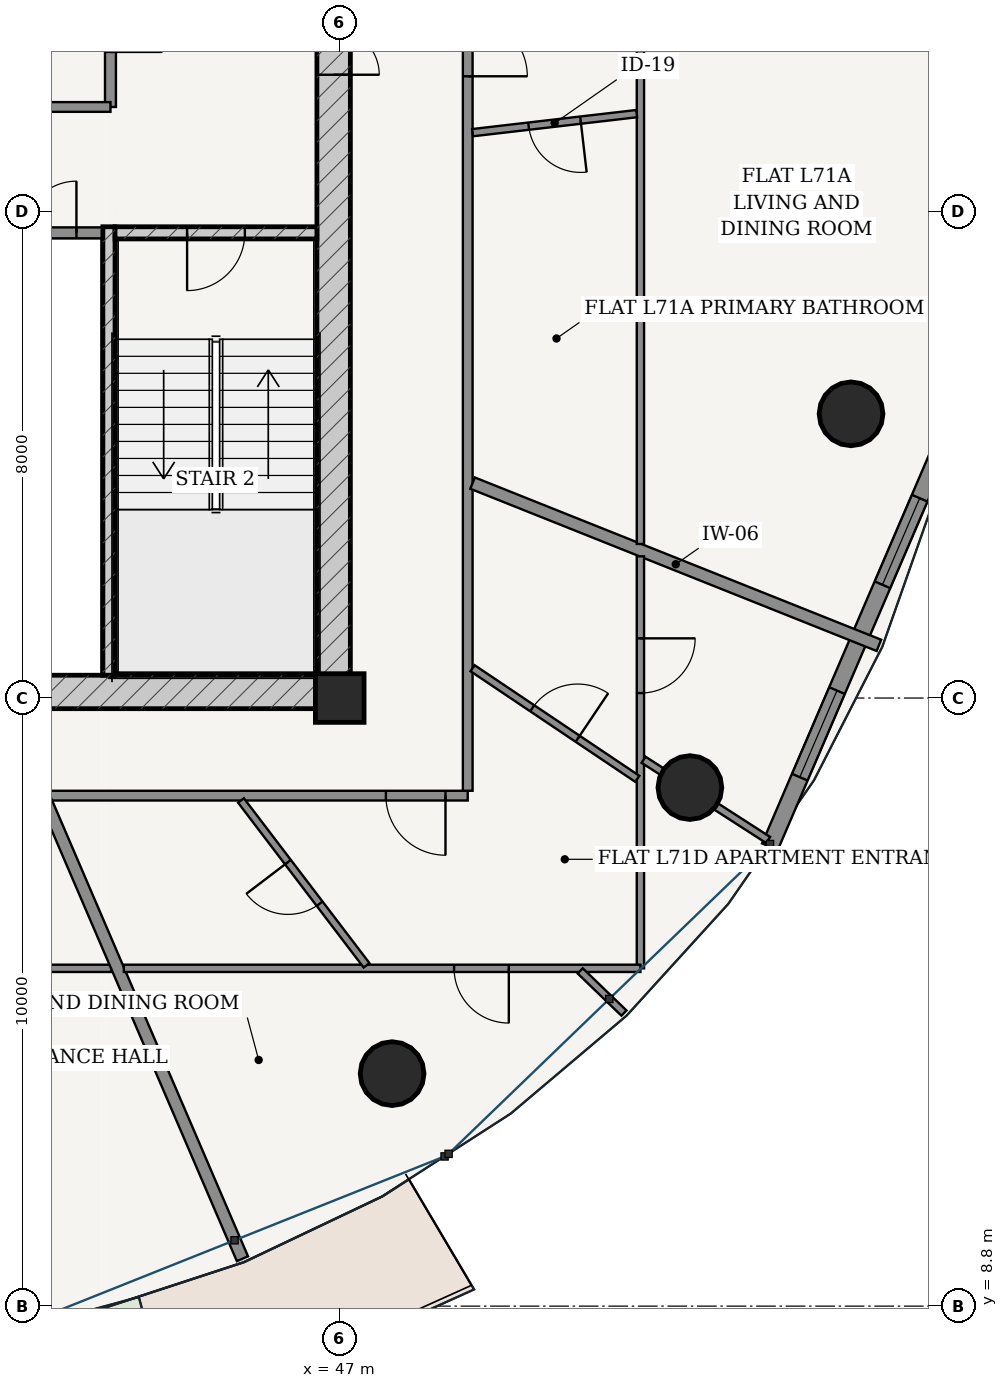
"""IFC4 building model, lengths in metres.
Left out: names, types, materials, properties, quantities, classifications, styles, units other than length and angle.
Written with IfcOpenShell. Run it as: python <this file> out.ifc"""

import sys

from ifc_helpers import new_model, si_unit, direction, frame, frame_2d, origin, origin_2d, place, context, subcontext, project, spatial, rectangle, hollow_circle, extrude, source, transform, mapped, element, fill, save


model = new_model("IFC4")
c1 = context("Model", 3, precision=1e-05, world=origin(), true_north=direction((-0.2419218956, 0.970295726276)))
c2 = subcontext(c1, "Body", "Model", "MODEL_VIEW")
j1 = project(units=[si_unit("LENGTHUNIT", "METRE"), si_unit("PLANEANGLEUNIT", "RADIAN")], contexts=[c1])
p1 = place(None, origin())
s1 = spatial("IfcSite", under=j1, at=p1, CompositionType="ELEMENT")
p2 = place(p1, origin())
s2 = spatial("IfcBuilding", under=s1, at=p2, CompositionType="ELEMENT")
p3 = place(p2, frame((0.0, 0.0, 270.7)))
s3 = spatial("IfcBuildingStorey", under=s2, at=p3, CompositionType="ELEMENT", Elevation=270.7)
p4 = place(p3, frame((47.0, 18.8, 0.0), z_axis=(0.0, 0.0, 1.0), x_axis=(1.0, 0.0, 0.0)))
e1 = element("IfcColumn", 1, at=p4, inside=s3, PredefinedType="COLUMN", context=c2, shape_type="SweptSolid", body=[
    extrude(rectangle(XDim=0.8, YDim=0.8, at=origin_2d()), origin(), (0.0, 0.0, 1.0), 3.75),
])
p5 = place(p3, frame((28.825, 18.9, 0.0), z_axis=(0.0, 0.0, 1.0), x_axis=(1.0, 0.0, 0.0)))
e2 = element("IfcWall", 2, at=p5, inside=s3, PredefinedType="SHEAR", context=c2, shape_type="SweptSolid", body=[
    extrude(rectangle(XDim=18.35, YDim=0.55, at=frame_2d((9.175, 0.0))), origin(), (0.0, 0.0, 1.0), 3.49),
])
p6 = place(p5, frame((6.71, 0.0, 0.0)))
e3 = element("IfcOpeningElement", 3, at=p6, cuts=e2, PredefinedType="OPENING", context=c2, shape_type="SweptSolid", body=[
    extrude(rectangle(XDim=0.85, YDim=2.1, at=frame_2d((0.425, 1.05))), frame((0.0, 0.285, 0.0), z_axis=(0.0, -1.0, 0.0), x_axis=(1.0, 0.0, 0.0)), (0.0, 0.0, 1.0), 0.57),
])
p7 = place(p5, frame((8.75, 0.0, 0.0)))
e4 = element("IfcOpeningElement", 4, at=p7, cuts=e2, PredefinedType="OPENING", context=c2, shape_type="SweptSolid", body=[
    extrude(rectangle(XDim=0.85, YDim=2.1, at=frame_2d((0.425, 1.05))), frame((0.0, 0.285, 0.0), z_axis=(0.0, -1.0, 0.0), x_axis=(1.0, 0.0, 0.0)), (0.0, 0.0, 1.0), 0.57),
])
p8 = place(p5, frame((10.79, 0.0, 0.0)))
e5 = element("IfcOpeningElement", 5, at=p8, cuts=e2, PredefinedType="OPENING", context=c2, shape_type="SweptSolid", body=[
    extrude(rectangle(XDim=0.85, YDim=2.1, at=frame_2d((0.425, 1.05))), frame((0.0, 0.285, 0.0), z_axis=(0.0, -1.0, 0.0), x_axis=(1.0, 0.0, 0.0)), (0.0, 0.0, 1.0), 0.57),
])
p9 = place(p3, frame((46.9, 19.175, 0.0), z_axis=(0.0, 0.0, 1.0), x_axis=(0.0, 1.0, 0.0)))
e6 = element("IfcWall", 6, at=p9, inside=s3, PredefinedType="SHEAR", context=c2, shape_type="SweptSolid", body=[
    extrude(rectangle(XDim=15.25, YDim=0.55, at=frame_2d((7.625, 0.0))), origin(), (0.0, 0.0, 1.0), 3.49),
])
p10 = place(p9, frame((9.875, 0.0, 0.0)))
e7 = element("IfcOpeningElement", 7, at=p10, cuts=e6, PredefinedType="OPENING", context=c2, shape_type="SweptSolid", body=[
    extrude(rectangle(XDim=1.5, YDim=2.2, at=frame_2d((0.75, 1.1))), frame((0.0, 0.285, 0.0), z_axis=(0.0, -1.0, 0.0), x_axis=(1.0, 0.0, 0.0)), (0.0, 0.0, 1.0), 0.57),
])
p11 = place(p3, frame((43.205, 19.175, 0.0), z_axis=(0.0, 0.0, 1.0), x_axis=(0.0, 1.0, 0.0)))
e8 = element("IfcWall", 8, at=p11, inside=s3, PredefinedType="SOLIDWALL", context=c2, shape_type="SweptSolid", body=[
    extrude(rectangle(XDim=7.375, YDim=0.2, at=frame_2d((3.688, 0.0))), origin(), (0.0, 0.0, 1.0), 3.49),
])
p12 = place(p3, frame((43.305, 26.45, 0.0), z_axis=(0.0, 0.0, 1.0), x_axis=(1.0, 0.0, 0.0)))
e9 = element("IfcWall", 9, at=p12, inside=s3, PredefinedType="SOLIDWALL", context=c2, shape_type="SweptSolid", body=[
    extrude(rectangle(XDim=3.32, YDim=0.2, at=frame_2d((1.66, 0.0))), origin(), (0.0, 0.0, 1.0), 3.49),
])
p13 = place(p12, frame((1.185, 0.0, 0.0)))
e10 = element("IfcOpeningElement", 10, at=p13, cuts=e9, PredefinedType="OPENING", context=c2, shape_type="SweptSolid", body=[
    extrude(rectangle(XDim=0.95, YDim=2.15, at=frame_2d((0.475, 1.075))), frame((0.0, 0.11, 0.0), z_axis=(0.0, -1.0, 0.0), x_axis=(1.0, 0.0, 0.0)), (0.0, 0.0, 1.0), 0.22),
])
for number, where, z_axis, x_axis in (
    (11, (47.861, 12.624, 0.0), (0.0, 0.0, 1.0), (1.0, 0.0, 0.0)),
    (12, (52.759, 17.328, 0.0), (0.0, 0.0, 1.0), (1.0, 0.0, 0.0)),
    (13, (55.409, 23.474, 0.0), (0.0, 0.0, 1.0), (1.0, 0.0, 0.0)),
):
    element("IfcColumn", number, at=place(p3, frame(where, z_axis=z_axis, x_axis=x_axis)), inside=s3, PredefinedType="COLUMN", context=c2, shape_type="SweptSolid", body=[
        extrude(hollow_circle(Radius=0.525, WallThickness=0.035, at=origin_2d()), origin(), (0.0, 0.0, 1.0), 3.75),
    ])
p14 = place(p3, frame((54.074, 16.354, 0.0), z_axis=(0.0, 0.0, 1.0), x_axis=(0.394816612978, 0.918759948037, 0.0)))
e14 = element("IfcWall", 14, at=p14, inside=s3, PredefinedType="SOLIDWALL", context=c2, shape_type="SweptSolid", body=[
    extrude(rectangle(XDim=7.485, YDim=0.28, at=frame_2d((3.743, 0.0))), origin(), (0.0, 0.0, 1.0), 3.49),
])
p15 = place(p14, frame((1.246, 0.0, 0.85)))
e15 = element("IfcOpeningElement", 15, at=p15, cuts=e14, PredefinedType="OPENING", context=c2, shape_type="SweptSolid", body=[
    extrude(rectangle(XDim=1.55, YDim=1.95, at=frame_2d((0.775, 0.975))), frame((0.0, 0.15, 0.0), z_axis=(0.0, -1.0, 0.0), x_axis=(1.0, 0.0, 0.0)), (0.0, 0.0, 1.0), 0.3),
])
p16 = place(p14, frame((4.689, 0.0, 0.85)))
e16 = element("IfcOpeningElement", 16, at=p16, cuts=e14, PredefinedType="OPENING", context=c2, shape_type="SweptSolid", body=[
    extrude(rectangle(XDim=1.55, YDim=1.95, at=frame_2d((0.775, 0.975))), frame((0.0, 0.15, 0.0), z_axis=(0.0, -1.0, 0.0), x_axis=(1.0, 0.0, 0.0)), (0.0, 0.0, 1.0), 0.3),
])
p17 = place(p3, frame((41.39, 26.45, 0.0), z_axis=(0.0, 0.0, 1.0), x_axis=(1.0, 0.0, 0.0)))
e17 = element("IfcWall", 17, at=p17, inside=s3, PredefinedType="PARTITIONING", context=c2, shape_type="SweptSolid", body=[
    extrude(rectangle(XDim=1.71, YDim=0.18, at=frame_2d((0.855, 0.0))), origin(), (0.0, 0.0, 1.0), 3.49),
])
p18 = place(p17, frame((0.43, 0.0, 0.0)))
e18 = element("IfcOpeningElement", 18, at=p18, cuts=e17, PredefinedType="OPENING", context=c2, shape_type="SweptSolid", body=[
    extrude(rectangle(XDim=0.85, YDim=2.1, at=frame_2d((0.425, 1.05))), frame((0.0, 0.1, 0.0), z_axis=(0.0, -1.0, 0.0), x_axis=(1.0, 0.0, 0.0)), (0.0, 0.0, 1.0), 0.2),
])
p19 = place(p3, frame((43.23, 28.52, 0.0), z_axis=(0.0, 0.0, 1.0), x_axis=(0.0, 1.0, 0.0)))
e19 = element("IfcWall", 19, at=p19, inside=s3, PredefinedType="PARTITIONING", context=c2, shape_type="SweptSolid", body=[
    extrude(rectangle(XDim=5.905, YDim=0.18, at=frame_2d((2.953, 0.0))), origin(), (0.0, 0.0, 1.0), 3.49),
])
p20 = place(p19, frame((0.905, 0.0, 0.0)))
e20 = element("IfcOpeningElement", 20, at=p20, cuts=e19, PredefinedType="OPENING", context=c2, shape_type="SweptSolid", body=[
    extrude(rectangle(XDim=0.85, YDim=2.1, at=frame_2d((0.425, 1.05))), frame((0.0, 0.1, 0.0), z_axis=(0.0, -1.0, 0.0), x_axis=(1.0, 0.0, 0.0)), (0.0, 0.0, 1.0), 0.2),
])
p21 = place(p19, frame((3.655, 0.0, 0.0)))
e21 = element("IfcOpeningElement", 21, at=p21, cuts=e19, PredefinedType="OPENING", context=c2, shape_type="SweptSolid", body=[
    extrude(rectangle(XDim=1.15, YDim=2.2, at=frame_2d((0.575, 1.1))), frame((0.0, 0.1, 0.0), z_axis=(0.0, -1.0, 0.0), x_axis=(1.0, 0.0, 0.0)), (0.0, 0.0, 1.0), 0.2),
])
p22 = place(p3, frame((41.39, 28.52, 0.0), z_axis=(0.0, 0.0, 1.0), x_axis=(1.0, 0.0, 0.0)))
e22 = element("IfcWall", 22, at=p22, inside=s3, PredefinedType="PARTITIONING", context=c2, shape_type="SweptSolid", body=[
    extrude(rectangle(XDim=1.84, YDim=0.16, at=frame_2d((0.92, 0.0))), origin(), (0.0, 0.0, 1.0), 3.49),
])
p23 = place(p3, frame((26.895, 17.195, 0.0), z_axis=(0.0, 0.0, 1.0), x_axis=(1.0, 0.0, 0.0)))
e23 = element("IfcWall", 23, at=p23, inside=s3, PredefinedType="PARTITIONING", context=c2, shape_type="SweptSolid", body=[
    extrude(rectangle(XDim=22.21, YDim=0.16, at=frame_2d((11.105, 0.0))), origin(), (0.0, 0.0, 1.0), 3.015),
])
p24 = place(p23, frame((9.746, 0.0, 0.0)))
e24 = element("IfcOpeningElement", 24, at=p24, cuts=e23, PredefinedType="OPENING", context=c2, shape_type="SweptSolid", body=[
    extrude(rectangle(XDim=0.98, YDim=2.2, at=frame_2d((0.49, 1.1))), frame((0.0, 0.09, 0.0), z_axis=(0.0, -1.0, 0.0), x_axis=(1.0, 0.0, 0.0)), (0.0, 0.0, 1.0), 0.18),
])
p25 = place(p23, frame((20.864, 0.0, 0.0)))
e25 = element("IfcOpeningElement", 25, at=p25, cuts=e23, PredefinedType="OPENING", context=c2, shape_type="SweptSolid", body=[
    extrude(rectangle(XDim=0.98, YDim=2.2, at=frame_2d((0.49, 1.1))), frame((0.0, 0.09, 0.0), z_axis=(0.0, -1.0, 0.0), x_axis=(1.0, 0.0, 0.0)), (0.0, 0.0, 1.0), 0.18),
])
p26 = place(p3, frame((49.105, 17.275, 0.0), z_axis=(0.0, 0.0, 1.0), x_axis=(0.0, 1.0, 0.0)))
e26 = element("IfcWall", 26, at=p26, inside=s3, PredefinedType="PARTITIONING", context=c2, shape_type="SweptSolid", body=[
    extrude(rectangle(XDim=13.925, YDim=0.16, at=frame_2d((6.962, 0.0))), origin(), (0.0, 0.0, 1.0), 3.015),
])
p27 = place(p26, frame((11.75, 0.0, 0.0)))
e27 = element("IfcOpeningElement", 27, at=p27, cuts=e26, PredefinedType="OPENING", context=c2, shape_type="SweptSolid", body=[
    extrude(rectangle(XDim=0.98, YDim=2.2, at=frame_2d((0.49, 1.1))), frame((0.0, 0.09, 0.0), z_axis=(0.0, -1.0, 0.0), x_axis=(1.0, 0.0, 0.0)), (0.0, 0.0, 1.0), 0.18),
])
p28 = place(p3, frame((49.185, 22.334, 0.0), z_axis=(0.0, 0.0, 1.0), x_axis=(0.928710518269, -0.370805573389, 0.0)))
e28 = element("IfcWall", 28, at=p28, inside=s3, PredefinedType="PARTITIONING", context=c2, shape_type="SweptSolid", body=[
    extrude(rectangle(XDim=7.195, YDim=0.2, at=frame_2d((3.598, 0.0))), origin(), (0.0, 0.0, 1.0), 3.121),
])
p29 = place(p3, frame((51.945, 34.12, 0.0), z_axis=(0.0, 0.0, 1.0), x_axis=(0.0, -1.0, 0.0)))
e29 = element("IfcWall", 29, at=p29, inside=s3, PredefinedType="PARTITIONING", context=c2, shape_type="SweptSolid", body=[
    extrude(rectangle(XDim=12.786, YDim=0.12, at=frame_2d((6.393, 0.0))), origin(), (0.0, 0.0, 1.0), 3.015),
])
p30 = place(p29, frame((2.562, 0.0, 0.0)))
e30 = element("IfcOpeningElement", 30, at=p30, cuts=e29, PredefinedType="OPENING", context=c2, shape_type="SweptSolid", body=[
    extrude(rectangle(XDim=0.9, YDim=2.15, at=frame_2d((0.45, 1.075))), frame((0.0, 0.07, 0.0), z_axis=(0.0, -1.0, 0.0), x_axis=(1.0, 0.0, 0.0)), (0.0, 0.0, 1.0), 0.14),
])
p31 = place(p3, frame((49.185, 28.098, 0.0), z_axis=(0.0, 0.0, 1.0), x_axis=(0.993339475655, 0.115224503057, 0.0)))
e31 = element("IfcWall", 31, at=p31, inside=s3, PredefinedType="PARTITIONING", context=c2, shape_type="SweptSolid", body=[
    extrude(rectangle(XDim=2.716, YDim=0.12, at=frame_2d((1.358, 0.0))), origin(), (0.0, 0.0, 1.0), 3.209),
])
p32 = place(p31, frame((0.928, 0.0, 0.0)))
e32 = element("IfcOpeningElement", 32, at=p32, cuts=e31, PredefinedType="OPENING", context=c2, shape_type="SweptSolid", body=[
    extrude(rectangle(XDim=0.86, YDim=2.15, at=frame_2d((0.43, 1.075))), frame((0.0, 0.07, 0.0), z_axis=(0.0, -1.0, 0.0), x_axis=(1.0, 0.0, 0.0)), (0.0, 0.0, 1.0), 0.14),
])
p33 = place(p3, frame((43.246, 14.355, 0.0), z_axis=(0.0, 0.0, 1.0), x_axis=(-1.0, 0.0, 0.0)))
e33 = element("IfcWall", 33, at=p33, inside=s3, PredefinedType="PARTITIONING", context=c2, shape_type="SweptSolid", body=[
    extrude(rectangle(XDim=13.771, YDim=0.12, at=frame_2d((6.885, 0.0))), origin(), (0.0, 0.0, 1.0), 3.015),
])
p34 = place(p33, frame((5.244, 0.0, 0.0)))
e34 = element("IfcOpeningElement", 34, at=p34, cuts=e33, PredefinedType="OPENING", context=c2, shape_type="SweptSolid", body=[
    extrude(rectangle(XDim=0.9, YDim=2.15, at=frame_2d((0.45, 1.075))), frame((0.0, 0.07, 0.0), z_axis=(0.0, -1.0, 0.0), x_axis=(1.0, 0.0, 0.0)), (0.0, 0.0, 1.0), 0.14),
])
p35 = place(p3, frame((42.162, 17.115, 0.0), z_axis=(0.0, 0.0, 1.0), x_axis=(0.394795631127, -0.918768964236, 0.0)))
e35 = element("IfcWall", 35, at=p35, inside=s3, PredefinedType="PARTITIONING", context=c2, shape_type="SweptSolid", body=[
    extrude(rectangle(XDim=8.202, YDim=0.2, at=frame_2d((4.101, 0.0))), origin(), (0.0, 0.0, 1.0), 3.121),
])
p36 = place(p3, frame((51.945, 21.13, 0.0), z_axis=(0.0, 0.0, 1.0), x_axis=(0.0, -1.0, 0.0)))
e36 = element("IfcWall", 36, at=p36, inside=s3, PredefinedType="PARTITIONING", context=c2, shape_type="SweptSolid", body=[
    extrude(rectangle(XDim=6.775, YDim=0.12, at=frame_2d((3.388, 0.0))), origin(), (0.0, 0.0, 1.0), 3.015),
])
p37 = place(p36, frame((1.349, 0.0, 0.0)))
e37 = element("IfcOpeningElement", 37, at=p37, cuts=e36, PredefinedType="OPENING", context=c2, shape_type="SweptSolid", body=[
    extrude(rectangle(XDim=0.9, YDim=2.15, at=frame_2d((0.45, 1.075))), frame((0.0, 0.07, 0.0), z_axis=(0.0, -1.0, 0.0), x_axis=(1.0, 0.0, 0.0)), (0.0, 0.0, 1.0), 0.14),
])
p38 = place(p3, frame((51.945, 14.355, 0.0), z_axis=(0.0, 0.0, 1.0), x_axis=(-1.0, 0.0, 0.0)))
e38 = element("IfcWall", 38, at=p38, inside=s3, PredefinedType="PARTITIONING", context=c2, shape_type="SweptSolid", body=[
    extrude(rectangle(XDim=8.495, YDim=0.12, at=frame_2d((4.248, 0.0))), origin(), (0.0, 0.0, 1.0), 3.015),
])
p39 = place(p38, frame((2.164, 0.0, 0.0)))
e39 = element("IfcOpeningElement", 39, at=p39, cuts=e38, PredefinedType="OPENING", context=c2, shape_type="SweptSolid", body=[
    extrude(rectangle(XDim=0.9, YDim=2.15, at=frame_2d((0.45, 1.075))), frame((0.0, 0.07, 0.0), z_axis=(0.0, -1.0, 0.0), x_axis=(1.0, 0.0, 0.0)), (0.0, 0.0, 1.0), 0.14),
])
p40 = place(p3, frame((50.956, 14.312, 0.0), z_axis=(0.0, 0.0, 1.0), x_axis=(0.7199490242, -0.694026946562, 0.0)))
e40 = element("IfcWall", 40, at=p40, inside=s3, PredefinedType="PARTITIONING", context=c2, shape_type="SweptSolid", body=[
    extrude(rectangle(XDim=0.998, YDim=0.12, at=frame_2d((0.499, 0.0))), origin(), (0.0, 0.0, 1.0), 3.49),
])
p41 = place(p3, frame((51.997, 17.785, 0.0), z_axis=(0.0, 0.0, 1.0), x_axis=(0.840715962824, -0.541476379774, 0.0)))
e41 = element("IfcWall", 41, at=p41, inside=s3, PredefinedType="PARTITIONING", context=c2, shape_type="SweptSolid", body=[
    extrude(rectangle(XDim=2.437, YDim=0.12, at=frame_2d((1.219, 0.0))), origin(), (0.0, 0.0, 1.0), 3.015),
])
p42 = place(p3, frame((45.377, 17.115, 0.0), z_axis=(0.0, 0.0, 1.0), x_axis=(0.60588776962, -0.795550130806, 0.0)))
e42 = element("IfcWall", 42, at=p42, inside=s3, PredefinedType="PARTITIONING", context=c2, shape_type="SweptSolid", body=[
    extrude(rectangle(XDim=3.407, YDim=0.12, at=frame_2d((1.704, 0.0))), origin(), (0.0, 0.0, 1.0), 3.209),
])
p43 = place(p42, frame((1.274, 0.0, 0.0)))
e43 = element("IfcOpeningElement", 43, at=p43, cuts=e42, PredefinedType="OPENING", context=c2, shape_type="SweptSolid", body=[
    extrude(rectangle(XDim=0.86, YDim=2.15, at=frame_2d((0.43, 1.075))), frame((0.0, 0.07, 0.0), z_axis=(0.0, -1.0, 0.0), x_axis=(1.0, 0.0, 0.0)), (0.0, 0.0, 1.0), 0.14),
])
p44 = place(p3, frame((49.185, 19.29, 0.0), z_axis=(0.0, 0.0, 1.0), x_axis=(0.830215193761, -0.557443030316, 0.0)))
e44 = element("IfcWall", 44, at=p44, inside=s3, PredefinedType="PARTITIONING", context=c2, shape_type="SweptSolid", body=[
    extrude(rectangle(XDim=3.262, YDim=0.12, at=frame_2d((1.631, 0.0))), origin(), (0.0, 0.0, 1.0), 3.209),
])
p45 = place(p44, frame((1.181, 0.0, 0.0)))
e45 = element("IfcOpeningElement", 45, at=p45, cuts=e44, PredefinedType="OPENING", context=c2, shape_type="SweptSolid", body=[
    extrude(rectangle(XDim=0.9, YDim=2.15, at=frame_2d((0.45, 1.075))), frame((0.0, 0.07, 0.0), z_axis=(0.0, -1.0, 0.0), x_axis=(1.0, 0.0, 0.0)), (0.0, 0.0, 1.0), 0.14),
])
m1 = source(origin(), c2, "Body", "SweptSolid", [
    extrude(rectangle(XDim=1.55, YDim=1.95, at=frame_2d((0.775, 0.975))), frame((0.0, 0.03, 0.0), z_axis=(0.0, -1.0, 0.0), x_axis=(1.0, 0.0, 0.0)), (0.0, 0.0, 1.0), 0.06),
])
p46 = place(p15, origin())
e46 = element("IfcWindow", 46, at=p46, inside=s3, PartitioningType="SINGLE_PANEL", PredefinedType="WINDOW", context=c2, shape_type="MappedRepresentation", body=[
    mapped(m1, transform((0.0, 0.0, 0.0), scale=1.0)),
])
fill(e15, e46)
p47 = place(p16, origin())
e47 = element("IfcWindow", 47, at=p47, inside=s3, PartitioningType="SINGLE_PANEL", PredefinedType="WINDOW", context=c2, shape_type="MappedRepresentation", body=[
    mapped(m1, transform((0.0, 0.0, 0.0), scale=1.0)),
])
fill(e16, e47)
m2 = source(origin(), c2, "Body", "SweptSolid", [
    extrude(rectangle(XDim=1.5, YDim=2.2, at=frame_2d((0.75, 1.1))), frame((0.0, 0.025, 0.0), z_axis=(0.0, -1.0, 0.0), x_axis=(1.0, 0.0, 0.0)), (0.0, 0.0, 1.0), 0.05),
])
p48 = place(p10, frame((1.5, 0.0, 0.0), z_axis=(0.0, 0.0, 1.0), x_axis=(-1.0, 0.0, 0.0)))
e48 = element("IfcDoor", 48, at=p48, inside=s3, OperationType="DOUBLE_DOOR_SINGLE_SWING", PredefinedType="DOOR", context=c2, shape_type="MappedRepresentation", body=[
    mapped(m2, transform((0.0, 0.0, 0.0), scale=1.0)),
])
fill(e7, e48)
m3 = source(origin(), c2, "Body", "SweptSolid", [
    extrude(rectangle(XDim=0.95, YDim=2.15, at=frame_2d((0.475, 1.075))), frame((0.0, 0.025, 0.0), z_axis=(0.0, -1.0, 0.0), x_axis=(1.0, 0.0, 0.0)), (0.0, 0.0, 1.0), 0.05),
])
p49 = place(p13, frame((0.95, 0.0, 0.0), z_axis=(0.0, 0.0, 1.0), x_axis=(-1.0, 0.0, 0.0)))
e49 = element("IfcDoor", 49, at=p49, inside=s3, OperationType="SINGLE_SWING_RIGHT", PredefinedType="DOOR", context=c2, shape_type="MappedRepresentation", body=[
    mapped(m3, transform((0.0, 0.0, 0.0), scale=1.0)),
])
fill(e10, e49)
m4 = source(origin(), c2, "Body", "SweptSolid", [
    extrude(rectangle(XDim=0.85, YDim=2.1, at=frame_2d((0.425, 1.05))), frame((0.0, 0.025, 0.0), z_axis=(0.0, -1.0, 0.0), x_axis=(1.0, 0.0, 0.0)), (0.0, 0.0, 1.0), 0.05),
])
p50 = place(p18, origin())
e50 = element("IfcDoor", 50, at=p50, inside=s3, OperationType="SINGLE_SWING_RIGHT", PredefinedType="DOOR", context=c2, shape_type="MappedRepresentation", body=[
    mapped(m4, transform((0.0, 0.0, 0.0), scale=1.0)),
])
fill(e18, e50)
m5 = source(origin(), c2, "Body", "SweptSolid", [
    extrude(rectangle(XDim=0.98, YDim=2.2, at=frame_2d((0.49, 1.1))), frame((0.0, 0.025, 0.0), z_axis=(0.0, -1.0, 0.0), x_axis=(1.0, 0.0, 0.0)), (0.0, 0.0, 1.0), 0.05),
])
p51 = place(p27, frame((0.98, 0.0, 0.0), z_axis=(0.0, 0.0, 1.0), x_axis=(-1.0, 0.0, 0.0)))
e51 = element("IfcDoor", 51, at=p51, inside=s3, OperationType="SINGLE_SWING_RIGHT", PredefinedType="DOOR", context=c2, shape_type="MappedRepresentation", body=[
    mapped(m5, transform((0.0, 0.0, 0.0), scale=1.0)),
])
fill(e27, e51)
m6 = source(origin(), c2, "Body", "SweptSolid", [
    extrude(rectangle(XDim=0.86, YDim=2.15, at=frame_2d((0.43, 1.075))), frame((0.0, 0.025, 0.0), z_axis=(0.0, -1.0, 0.0), x_axis=(1.0, 0.0, 0.0)), (0.0, 0.0, 1.0), 0.05),
])
p52 = place(p32, frame((0.86, 0.0, 0.0), z_axis=(0.0, 0.0, 1.0), x_axis=(-1.0, 0.0, 0.0)))
e52 = element("IfcDoor", 52, at=p52, inside=s3, OperationType="SINGLE_SWING_LEFT", PredefinedType="DOOR", context=c2, shape_type="MappedRepresentation", body=[
    mapped(m6, transform((0.0, 0.0, 0.0), scale=1.0)),
])
fill(e32, e52)
p53 = place(p25, frame((0.98, 0.0, 0.0), z_axis=(0.0, 0.0, 1.0), x_axis=(-1.0, 0.0, 0.0)))
e53 = element("IfcDoor", 53, at=p53, inside=s3, OperationType="SINGLE_SWING_LEFT", PredefinedType="DOOR", context=c2, shape_type="MappedRepresentation", body=[
    mapped(m5, transform((0.0, 0.0, 0.0), scale=1.0)),
])
fill(e25, e53)
p54 = place(p43, frame((0.86, 0.0, 0.0), z_axis=(0.0, 0.0, 1.0), x_axis=(-1.0, 0.0, 0.0)))
e54 = element("IfcDoor", 54, at=p54, inside=s3, OperationType="SINGLE_SWING_RIGHT", PredefinedType="DOOR", context=c2, shape_type="MappedRepresentation", body=[
    mapped(m6, transform((0.0, 0.0, 0.0), scale=1.0)),
])
fill(e43, e54)
m7 = source(origin(), c2, "Body", "SweptSolid", [
    extrude(rectangle(XDim=0.9, YDim=2.15, at=frame_2d((0.45, 1.075))), frame((0.0, 0.025, 0.0), z_axis=(0.0, -1.0, 0.0), x_axis=(1.0, 0.0, 0.0)), (0.0, 0.0, 1.0), 0.05),
])
p55 = place(p39, origin())
e55 = element("IfcDoor", 55, at=p55, inside=s3, OperationType="SINGLE_SWING_LEFT", PredefinedType="DOOR", context=c2, shape_type="MappedRepresentation", body=[
    mapped(m7, transform((0.0, 0.0, 0.0), scale=1.0)),
])
fill(e39, e55)
p56 = place(p45, origin())
e56 = element("IfcDoor", 56, at=p56, inside=s3, OperationType="SINGLE_SWING_RIGHT", PredefinedType="DOOR", context=c2, shape_type="MappedRepresentation", body=[
    mapped(m7, transform((0.0, 0.0, 0.0), scale=1.0)),
])
fill(e45, e56)
p57 = place(p37, origin())
e57 = element("IfcDoor", 57, at=p57, inside=s3, OperationType="SINGLE_SWING_LEFT", PredefinedType="DOOR", context=c2, shape_type="MappedRepresentation", body=[
    mapped(m7, transform((0.0, 0.0, 0.0), scale=1.0)),
])
fill(e37, e57)
save(model, sys.argv[1])
